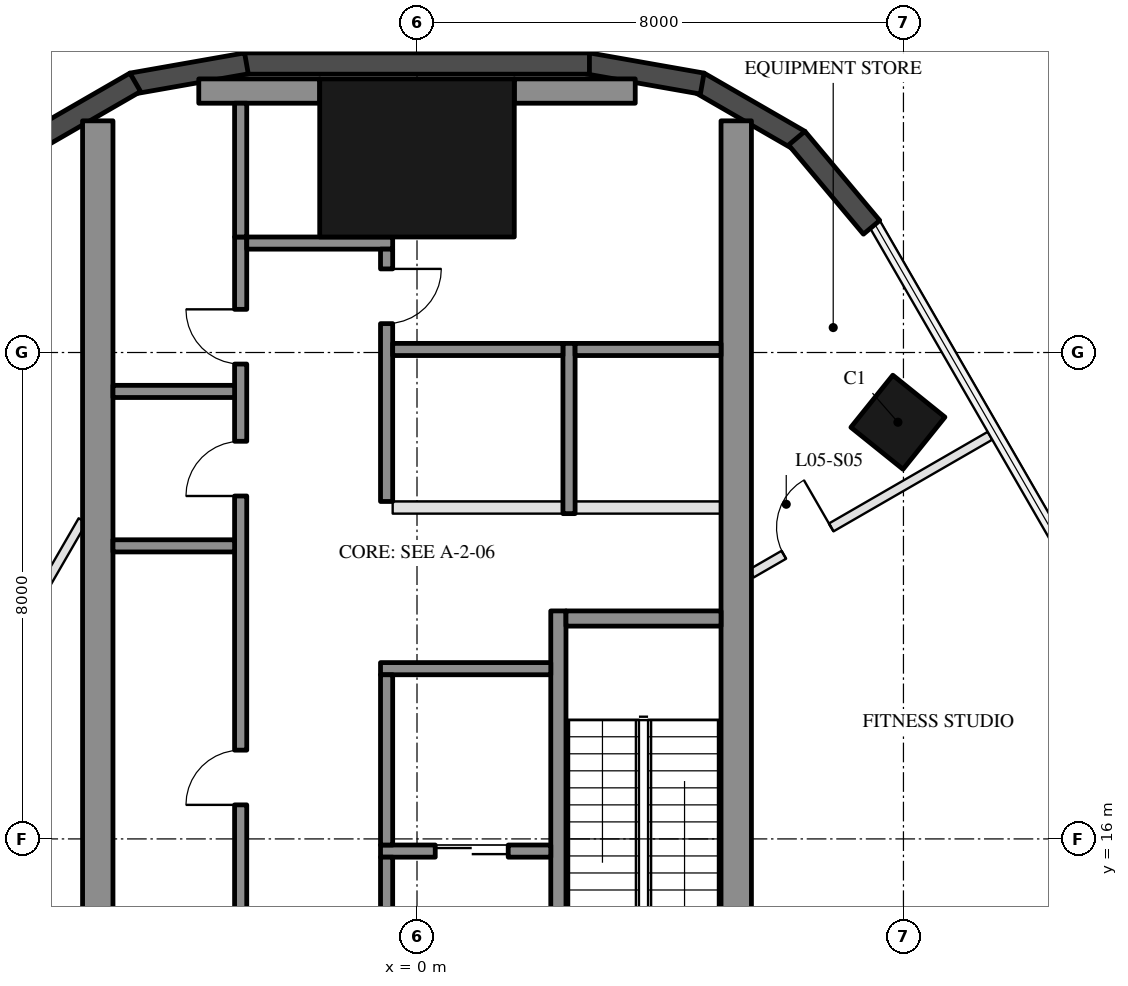
"""IFC4 building model, lengths in metres.
Left out: names, types, materials, properties, quantities, classifications, styles, units other than length and angle.
Written with IfcOpenShell. Run it as: python <this file> out.ifc"""

import sys

from ifc_helpers import new_model, si_unit, direction, frame, frame_2d, origin, origin_2d, place, context, subcontext, project, spatial, rectangle, hollow_rectangle, extrude, boolean, halfspace, element, fill, save


model = new_model("IFC4")
c1 = context("Model", 3, precision=1e-05, world=origin(), true_north=direction((0.0, 1.0)))
c2 = subcontext(c1, "Body", "Model", "MODEL_VIEW")
j1 = project(units=[si_unit("LENGTHUNIT", "METRE"), si_unit("PLANEANGLEUNIT", "RADIAN")], contexts=[c1])
p1 = place(None, origin())
s1 = spatial("IfcSite", under=j1, at=p1, CompositionType="ELEMENT")
p2 = place(p1, origin())
s2 = spatial("IfcBuilding", under=s1, at=p2, CompositionType="ELEMENT")
p3 = place(p2, frame((0.0, 0.0, 33.0)))
s3 = spatial("IfcBuildingStorey", under=s2, at=p3, CompositionType="ELEMENT", Elevation=33.0)
p4 = place(p3, frame((7.909, 22.854, 0.0), z_axis=(-0.004719641607, -0.012314467182, 0.999913035659), x_axis=(-0.503343741395, 0.864046735596, 0.008265391899)))
e1 = element("IfcColumn", 1, at=p4, inside=s3, PredefinedType="COLUMN", context=c2, shape_type="SweptSolid", body=[
    boolean("DIFFERENCE", boolean("DIFFERENCE", extrude(hollow_rectangle(XDim=1.1, YDim=1.1, WallThickness=0.05, at=origin_2d()), origin(), (0.0, 0.0, 1.0), 4.5), halfspace(frame((0.0, 0.0, 0.012), z_axis=(0.0, 0.0, 1.0), x_axis=(1.0, 0.0, 0.0)), True)), halfspace(frame((0.0, 0.0, 4.493), z_axis=(0.0, 0.0, 1.0), x_axis=(1.0, 0.0, 0.0)), False)),
])
p5 = place(p3, frame((0.0, 27.2, 0.0), z_axis=(0.0, 0.0, 1.0), x_axis=(1.0, 0.0, 0.0)))
e2 = element("IfcColumn", 2, at=p5, inside=s3, PredefinedType="COLUMN", context=c2, shape_type="SweptSolid", body=[
    extrude(hollow_rectangle(XDim=3.2, YDim=2.6, WallThickness=0.08, at=origin_2d()), origin(), (0.0, 0.0, 1.0), 4.5),
])
for number, where, z_axis, x_axis in (
    (3, (6.292, 27.486, 0.0), (0.0, 0.0, 1.0), (-0.866, 0.5, 0.0)),
    (4, (4.691, 28.423, 0.0), (0.0, 0.0, 1.0), (-0.985, 0.174, 0.0)),
):
    element("IfcWall", number, at=place(p3, frame(where, z_axis=z_axis, x_axis=x_axis)), inside=s3, PredefinedType="SOLIDWALL", context=c2, shape_type="SweptSolid", body=[
        extrude(rectangle(XDim=1.915, YDim=0.35, at=frame_2d((0.957, 0.0))), origin(), (0.0, 0.0, 1.0), 4.2),
    ])
p6 = place(p3, frame((2.836, 28.753, 0.0), z_axis=(0.0, 0.0, 1.0), x_axis=(-1.0, 0.0, 0.0)))
e5 = element("IfcWall", 5, at=p6, inside=s3, PredefinedType="SOLIDWALL", context=c2, shape_type="SweptSolid", body=[
    extrude(rectangle(XDim=5.671, YDim=0.35, at=frame_2d((2.836, 0.0))), origin(), (0.0, 0.0, 1.0), 4.2),
])
for number, where, z_axis, x_axis in (
    (6, (-2.805, 28.755, 0.0), (0.0, 0.0, 1.0), (-0.985, -0.174, 0.0)),
    (7, (-4.634, 28.444, 0.0), (0.0, 0.0, 1.0), (-0.866, -0.5, 0.0)),
    (8, (7.476, 26.059, 0.0), (0.0, 0.0, 1.0), (-0.643, 0.766, 0.0)),
):
    element("IfcWall", number, at=place(p3, frame(where, z_axis=z_axis, x_axis=x_axis)), inside=s3, PredefinedType="SOLIDWALL", context=c2, shape_type="SweptSolid", body=[
        extrude(rectangle(XDim=1.915, YDim=0.35, at=frame_2d((0.957, 0.0))), origin(), (0.0, 0.0, 1.0), 4.2),
    ])
for number, where, z_axis, x_axis in (
    (9, (5.25, 12.9, 0.0), (0.0, 0.0, 1.0), (0.0, 1.0, 0.0)),
    (10, (-5.25, 12.9, 0.0), (0.0, 0.0, 1.0), (0.0, 1.0, 0.0)),
):
    element("IfcWall", number, at=place(p3, frame(where, z_axis=z_axis, x_axis=x_axis)), inside=s3, PredefinedType="SHEAR", context=c2, shape_type="SweptSolid", body=[
        extrude(rectangle(XDim=14.91, YDim=0.5, at=frame_2d((7.455, 0.0))), origin(), (0.0, 0.0, 1.0), 4.2),
    ])
for number, where, z_axis, x_axis in (
    (11, (-1.6, 28.3, 0.0), (0.0, 0.0, 1.0), (-1.0, 0.0, 0.0)),
    (12, (3.589, 28.3, 0.0), (0.0, 0.0, 1.0), (-1.0, 0.0, 0.0)),
):
    element("IfcWall", number, at=place(p3, frame(where, z_axis=z_axis, x_axis=x_axis)), inside=s3, PredefinedType="SHEAR", context=c2, shape_type="SweptSolid", body=[
        extrude(rectangle(XDim=1.989, YDim=0.4, at=frame_2d((0.995, 0.0))), origin(), (0.0, 0.0, 1.0), 4.2),
    ])
p7 = place(p3, frame((2.325, 13.3, 0.0), z_axis=(0.0, 0.0, 1.0), x_axis=(0.0, 1.0, 0.0)))
e13 = element("IfcWall", 13, at=p7, inside=s3, PredefinedType="SHEAR", context=c2, shape_type="SweptSolid", body=[
    extrude(rectangle(XDim=6.45, YDim=0.25, at=frame_2d((3.225, 0.0))), origin(), (0.0, 0.0, 1.0), 4.2),
])
p8 = place(p7, frame((0.3, 0.0, 0.0)))
e14 = element("IfcOpeningElement", 14, at=p8, cuts=e13, PredefinedType="OPENING", context=c2, shape_type="SweptSolid", body=[
    extrude(rectangle(XDim=1.0, YDim=2.1, at=frame_2d((0.5, 1.05))), frame((0.0, 0.135, 0.0), z_axis=(0.0, -1.0, 0.0), x_axis=(1.0, 0.0, 0.0)), (0.0, 0.0, 1.0), 0.27),
])
p9 = place(p3, frame((5.0, 19.625, 0.0), z_axis=(0.0, 0.0, 1.0), x_axis=(-1.0, 0.0, 0.0)))
e15 = element("IfcWall", 15, at=p9, inside=s3, PredefinedType="SHEAR", context=c2, shape_type="SweptSolid", body=[
    extrude(rectangle(XDim=2.55, YDim=0.25, at=frame_2d((1.275, 0.0))), origin(), (0.0, 0.0, 1.0), 4.2),
])
p10 = place(p3, frame((2.2, 18.8, 0.0), z_axis=(0.0, 0.0, 1.0), x_axis=(-1.0, 0.0, 0.0)))
e16 = element("IfcWall", 16, at=p10, inside=s3, PredefinedType="SHEAR", context=c2, shape_type="SweptSolid", body=[
    extrude(rectangle(XDim=2.8, YDim=0.2, at=frame_2d((1.4, 0.0))), origin(), (0.0, 0.0, 1.0), 4.2),
])
p11 = place(p3, frame((2.2, 15.8, 0.0), z_axis=(0.0, 0.0, 1.0), x_axis=(-1.0, 0.0, 0.0)))
e17 = element("IfcWall", 17, at=p11, inside=s3, PredefinedType="SHEAR", context=c2, shape_type="SweptSolid", body=[
    extrude(rectangle(XDim=2.8, YDim=0.2, at=frame_2d((1.4, 0.0))), origin(), (0.0, 0.0, 1.0), 4.2),
])
p12 = place(p11, frame((0.7, 0.0, 0.0)))
e18 = element("IfcOpeningElement", 18, at=p12, cuts=e17, PredefinedType="OPENING", context=c2, shape_type="SweptSolid", body=[
    extrude(rectangle(XDim=1.2, YDim=2.1, at=frame_2d((0.6, 1.05))), frame((0.0, 0.11, 0.0), z_axis=(0.0, -1.0, 0.0), x_axis=(1.0, 0.0, 0.0)), (0.0, 0.0, 1.0), 0.22),
])
p13 = place(p3, frame((-0.5, 15.9, 0.0), z_axis=(0.0, 0.0, 1.0), x_axis=(0.0, 1.0, 0.0)))
e19 = element("IfcWall", 19, at=p13, inside=s3, PredefinedType="SHEAR", context=c2, shape_type="SweptSolid", body=[
    extrude(rectangle(XDim=2.8, YDim=0.2, at=frame_2d((1.4, 0.0))), origin(), (0.0, 0.0, 1.0), 4.2),
])
p14 = place(p3, frame((-0.5, 13.3, 0.0), z_axis=(0.0, 0.0, 1.0), x_axis=(0.0, 1.0, 0.0)))
e20 = element("IfcWall", 20, at=p14, inside=s3, PredefinedType="SHEAR", context=c2, shape_type="SweptSolid", body=[
    extrude(rectangle(XDim=2.4, YDim=0.2, at=frame_2d((1.2, 0.0))), origin(), (0.0, 0.0, 1.0), 4.2),
])
p15 = place(p3, frame((-2.9, 13.3, 0.0), z_axis=(0.0, 0.0, 1.0), x_axis=(0.0, 1.0, 0.0)))
e21 = element("IfcWall", 21, at=p15, inside=s3, PredefinedType="SHEAR", context=c2, shape_type="SweptSolid", body=[
    extrude(rectangle(XDim=12.6, YDim=0.2, at=frame_2d((6.3, 0.0))), origin(), (0.0, 0.0, 1.0), 4.2),
])
p16 = place(p15, frame((3.26, 0.0, 0.0)))
e22 = element("IfcOpeningElement", 22, at=p16, cuts=e21, PredefinedType="OPENING", context=c2, shape_type="SweptSolid", body=[
    extrude(rectangle(XDim=0.9, YDim=2.1, at=frame_2d((0.45, 1.05))), frame((0.0, 0.11, 0.0), z_axis=(0.0, -1.0, 0.0), x_axis=(1.0, 0.0, 0.0)), (0.0, 0.0, 1.0), 0.22),
])
p17 = place(p15, frame((8.34, 0.0, 0.0)))
e23 = element("IfcOpeningElement", 23, at=p17, cuts=e21, PredefinedType="OPENING", context=c2, shape_type="SweptSolid", body=[
    extrude(rectangle(XDim=0.9, YDim=2.1, at=frame_2d((0.45, 1.05))), frame((0.0, 0.11, 0.0), z_axis=(0.0, -1.0, 0.0), x_axis=(1.0, 0.0, 0.0)), (0.0, 0.0, 1.0), 0.22),
])
p18 = place(p15, frame((10.51, 0.0, 0.0)))
e24 = element("IfcOpeningElement", 24, at=p18, cuts=e21, PredefinedType="OPENING", context=c2, shape_type="SweptSolid", body=[
    extrude(rectangle(XDim=0.9, YDim=2.1, at=frame_2d((0.45, 1.05))), frame((0.0, 0.11, 0.0), z_axis=(0.0, -1.0, 0.0), x_axis=(1.0, 0.0, 0.0)), (0.0, 0.0, 1.0), 0.22),
])
p19 = place(p3, frame((-0.4, 25.8, 0.0), z_axis=(0.0, 0.0, 1.0), x_axis=(-1.0, 0.0, 0.0)))
e25 = element("IfcWall", 25, at=p19, inside=s3, PredefinedType="SHEAR", context=c2, shape_type="SweptSolid", body=[
    extrude(rectangle(XDim=2.4, YDim=0.2, at=frame_2d((1.2, 0.0))), origin(), (0.0, 0.0, 1.0), 4.2),
])
p20 = place(p3, frame((-0.5, 21.55, 0.0), z_axis=(0.0, 0.0, 1.0), x_axis=(0.0, 1.0, 0.0)))
e26 = element("IfcWall", 26, at=p20, inside=s3, PredefinedType="SHEAR", context=c2, shape_type="SweptSolid", body=[
    extrude(rectangle(XDim=4.15, YDim=0.2, at=frame_2d((2.075, 0.0))), origin(), (0.0, 0.0, 1.0), 4.2),
])
p21 = place(p20, frame((2.925, 0.0, 0.0)))
e27 = element("IfcOpeningElement", 27, at=p21, cuts=e26, PredefinedType="OPENING", context=c2, shape_type="SweptSolid", body=[
    extrude(rectangle(XDim=0.9, YDim=2.1, at=frame_2d((0.45, 1.05))), frame((0.0, 0.11, 0.0), z_axis=(0.0, -1.0, 0.0), x_axis=(1.0, 0.0, 0.0)), (0.0, 0.0, 1.0), 0.22),
])
for number, where, z_axis, x_axis in (
    (28, (-3.0, 20.82, 0.0), (0.0, 0.0, 1.0), (-1.0, 0.0, 0.0)),
    (29, (-3.0, 23.36, 0.0), (0.0, 0.0, 1.0), (-1.0, 0.0, 0.0)),
):
    element("IfcWall", number, at=place(p3, frame(where, z_axis=z_axis, x_axis=x_axis)), inside=s3, PredefinedType="SHEAR", context=c2, shape_type="SweptSolid", body=[
        extrude(rectangle(XDim=2.0, YDim=0.2, at=frame_2d((1.0, 0.0))), origin(), (0.0, 0.0, 1.0), 4.2),
    ])
p22 = place(p3, frame((-2.9, 25.9, 0.0), z_axis=(0.0, 0.0, 1.0), x_axis=(0.0, 1.0, 0.0)))
e30 = element("IfcWall", 30, at=p22, inside=s3, PredefinedType="SHEAR", context=c2, shape_type="SweptSolid", body=[
    extrude(rectangle(XDim=2.2, YDim=0.2, at=frame_2d((1.1, 0.0))), origin(), (0.0, 0.0, 1.0), 4.2),
])
p23 = place(p3, frame((2.5, 21.35, 0.0), z_axis=(0.0, 0.0, 1.0), x_axis=(0.0, 1.0, 0.0)))
e31 = element("IfcWall", 31, at=p23, inside=s3, PredefinedType="SHEAR", context=c2, shape_type="SweptSolid", body=[
    extrude(rectangle(XDim=2.8, YDim=0.2, at=frame_2d((1.4, 0.0))), origin(), (0.0, 0.0, 1.0), 4.2),
])
p24 = place(p3, frame((5.0, 24.05, 0.0), z_axis=(0.0, 0.0, 1.0), x_axis=(-1.0, 0.0, 0.0)))
e32 = element("IfcWall", 32, at=p24, inside=s3, PredefinedType="SHEAR", context=c2, shape_type="SweptSolid", body=[
    extrude(rectangle(XDim=2.4, YDim=0.2, at=frame_2d((1.2, 0.0))), origin(), (0.0, 0.0, 1.0), 4.2),
])
p25 = place(p3, frame((2.4, 24.05, 0.0), z_axis=(0.0, 0.0, 1.0), x_axis=(-1.0, 0.0, 0.0)))
e33 = element("IfcWall", 33, at=p25, inside=s3, PredefinedType="SHEAR", context=c2, shape_type="SweptSolid", body=[
    extrude(rectangle(XDim=2.8, YDim=0.2, at=frame_2d((1.4, 0.0))), origin(), (0.0, 0.0, 1.0), 4.2),
])
p26 = place(p3, frame((5.0, 21.45, 0.0), z_axis=(0.0, 0.0, 1.0), x_axis=(-1.0, 0.0, 0.0)))
e34 = element("IfcWall", 34, at=p26, inside=s3, PredefinedType="PARTITIONING", context=c2, shape_type="SweptSolid", body=[
    extrude(rectangle(XDim=2.4, YDim=0.2, at=frame_2d((1.2, 0.0))), origin(), (0.0, 0.0, 1.0), 4.2),
])
p27 = place(p3, frame((2.4, 21.45, 0.0), z_axis=(0.0, 0.0, 1.0), x_axis=(-1.0, 0.0, 0.0)))
e35 = element("IfcWall", 35, at=p27, inside=s3, PredefinedType="PARTITIONING", context=c2, shape_type="SweptSolid", body=[
    extrude(rectangle(XDim=2.8, YDim=0.2, at=frame_2d((1.4, 0.0))), origin(), (0.0, 0.0, 1.0), 4.2),
])
p28 = place(p3, frame((13.667, 15.281, 0.0), z_axis=(0.0, 0.0, 1.0), x_axis=(-0.866027503583, -0.499996363024, 0.0)))
e36 = element("IfcWall", 36, at=p28, inside=s3, PredefinedType="SOLIDWALL", context=c2, shape_type="SweptSolid", body=[
    extrude(rectangle(XDim=10.776, YDim=0.2, at=frame_2d((5.388, 0.0))), origin(), (0.0, 0.0, 1.0), 4.2),
])
p29 = place(p3, frame((9.423, 22.631, 0.0), z_axis=(0.0, 0.0, 1.0), x_axis=(-0.866012369481, -0.500022575396, 0.0)))
e37 = element("IfcWall", 37, at=p29, inside=s3, PredefinedType="PARTITIONING", context=c2, shape_type="SweptSolid", body=[
    extrude(rectangle(XDim=4.53, YDim=0.15, at=frame_2d((2.265, 0.0))), origin(), (0.0, 0.0, 1.0), 4.2),
])
p30 = place(p29, frame((3.015, 0.0, 0.0)))
e38 = element("IfcOpeningElement", 38, at=p30, cuts=e37, PredefinedType="OPENING", context=c2, shape_type="SweptSolid", body=[
    extrude(rectangle(XDim=0.9, YDim=2.1, at=frame_2d((0.45, 1.05))), frame((0.0, 0.085, 0.0), z_axis=(0.0, -1.0, 0.0), x_axis=(1.0, 0.0, 0.0)), (0.0, 0.0, 1.0), 0.17),
])
p31 = place(p3, frame((-5.5, 21.236, 0.0), z_axis=(0.0, 0.0, 1.0), x_axis=(-0.499999852422, -0.866025488988, 0.0)))
e39 = element("IfcWall", 39, at=p31, inside=s3, PredefinedType="PARTITIONING", context=c2, shape_type="SweptSolid", body=[
    extrude(rectangle(XDim=9.066, YDim=0.15, at=frame_2d((4.533, 0.0))), origin(), (0.0, 0.0, 1.0), 3.51),
])
p32 = place(p31, frame((3.965, 0.0, 0.0)))
e40 = element("IfcOpeningElement", 40, at=p32, cuts=e39, PredefinedType="OPENING", context=c2, shape_type="SweptSolid", body=[
    extrude(rectangle(XDim=1.2, YDim=2.1, at=frame_2d((0.6, 1.05))), frame((0.0, 0.085, 0.0), z_axis=(0.0, -1.0, 0.0), x_axis=(1.0, 0.0, 0.0)), (0.0, 0.0, 1.0), 0.17),
])
p33 = place(p3, frame((-13.617, 15.367, 0.0), z_axis=(0.0, 0.0, 1.0), x_axis=(0.866027503583, -0.499996363024, 0.0)))
e41 = element("IfcWall", 41, at=p33, inside=s3, PredefinedType="PARTITIONING", context=c2, shape_type="SweptSolid", body=[
    extrude(rectangle(XDim=10.776, YDim=0.15, at=frame_2d((5.388, 0.0))), origin(), (0.0, 0.0, 1.0), 4.2),
])
p34 = place(p12, origin())
e42 = element("IfcDoor", 42, at=p34, inside=s3, OperationType="DOUBLE_DOOR_SLIDING", PredefinedType="DOOR", context=c2, shape_type="SweptSolid", body=[
    extrude(rectangle(XDim=1.2, YDim=2.1, at=frame_2d((0.6, 1.05))), frame((0.0, 0.025, 0.0), z_axis=(0.0, -1.0, 0.0), x_axis=(1.0, 0.0, 0.0)), (0.0, 0.0, 1.0), 0.05),
])
fill(e18, e42)
p35 = place(p16, origin())
e43 = element("IfcDoor", 43, at=p35, inside=s3, OperationType="SINGLE_SWING_LEFT", PredefinedType="DOOR", context=c2, shape_type="SweptSolid", body=[
    extrude(rectangle(XDim=0.9, YDim=2.1, at=frame_2d((0.45, 1.05))), frame((0.0, 0.025, 0.0), z_axis=(0.0, -1.0, 0.0), x_axis=(1.0, 0.0, 0.0)), (0.0, 0.0, 1.0), 0.05),
])
fill(e22, e43)
p36 = place(p17, origin())
e44 = element("IfcDoor", 44, at=p36, inside=s3, OperationType="SINGLE_SWING_LEFT", PredefinedType="DOOR", context=c2, shape_type="SweptSolid", body=[
    extrude(rectangle(XDim=0.9, YDim=2.1, at=frame_2d((0.45, 1.05))), frame((0.0, 0.025, 0.0), z_axis=(0.0, -1.0, 0.0), x_axis=(1.0, 0.0, 0.0)), (0.0, 0.0, 1.0), 0.05),
])
fill(e23, e44)
p37 = place(p18, origin())
e45 = element("IfcDoor", 45, at=p37, inside=s3, OperationType="SINGLE_SWING_RIGHT", PredefinedType="DOOR", context=c2, shape_type="SweptSolid", body=[
    extrude(rectangle(XDim=0.9, YDim=2.1, at=frame_2d((0.45, 1.05))), frame((0.0, 0.025, 0.0), z_axis=(0.0, -1.0, 0.0), x_axis=(1.0, 0.0, 0.0)), (0.0, 0.0, 1.0), 0.05),
])
fill(e24, e45)
p38 = place(p21, frame((0.9, 0.0, 0.0), z_axis=(0.0, 0.0, 1.0), x_axis=(-1.0, 0.0, 0.0)))
e46 = element("IfcDoor", 46, at=p38, inside=s3, OperationType="SINGLE_SWING_LEFT", PredefinedType="DOOR", context=c2, shape_type="SweptSolid", body=[
    extrude(rectangle(XDim=0.9, YDim=2.1, at=frame_2d((0.45, 1.05))), frame((0.0, 0.025, 0.0), z_axis=(0.0, -1.0, 0.0), x_axis=(1.0, 0.0, 0.0)), (0.0, 0.0, 1.0), 0.05),
])
fill(e27, e46)
p39 = place(p30, frame((0.9, 0.0, 0.0), z_axis=(0.0, 0.0, 1.0), x_axis=(-1.0, 0.0, 0.0)))
e47 = element("IfcDoor", 47, at=p39, inside=s3, OperationType="SINGLE_SWING_RIGHT", PredefinedType="DOOR", context=c2, shape_type="SweptSolid", body=[
    extrude(rectangle(XDim=0.9, YDim=2.1, at=frame_2d((0.45, 1.05))), frame((0.0, 0.025, 0.0), z_axis=(0.0, -1.0, 0.0), x_axis=(1.0, 0.0, 0.0)), (0.0, 0.0, 1.0), 0.05),
])
fill(e38, e47)
save(model, sys.argv[1])
